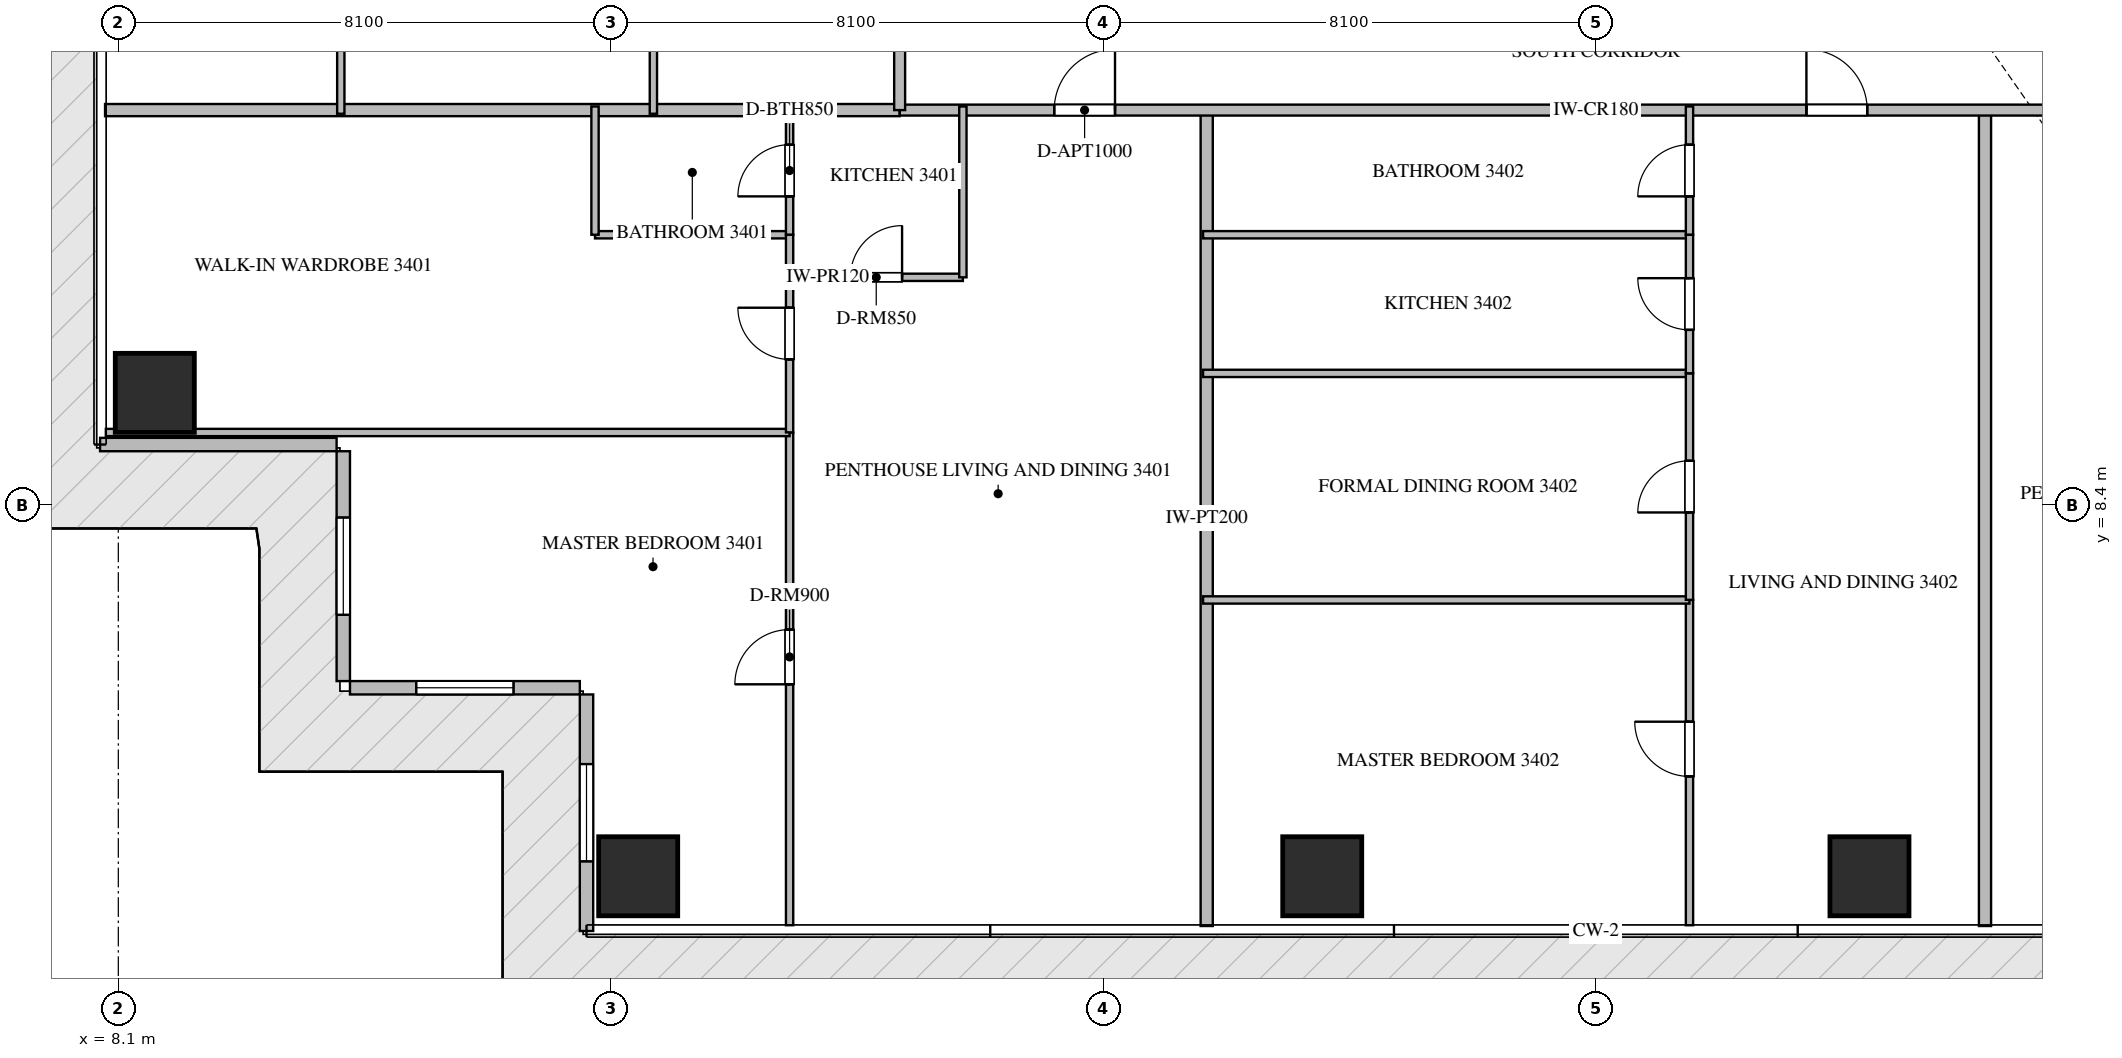
"""IFC4 building model, lengths in metres.
Left out: names, types, materials, properties, quantities, classifications, styles, units other than length and angle.
Written with IfcOpenShell. Run it as: python <this file> out.ifc"""

import sys

from ifc_helpers import new_model, si_unit, direction, frame, frame_2d, origin, origin_2d, place, context, subcontext, project, spatial, rectangle, extrude, source, transform, mapped, element, fill, save


model = new_model("IFC4")
c1 = context("Model", 3, precision=1e-05, world=origin(), true_north=direction((0.0, 1.0)))
c2 = subcontext(c1, "Body", "Model", "MODEL_VIEW")
j1 = project(units=[si_unit("LENGTHUNIT", "METRE"), si_unit("PLANEANGLEUNIT", "RADIAN")], contexts=[c1])
p1 = place(None, origin())
s1 = spatial("IfcSite", under=j1, at=p1, CompositionType="ELEMENT")
p2 = place(p1, origin())
s2 = spatial("IfcBuilding", under=s1, at=p2, CompositionType="ELEMENT")
p3 = place(p2, frame((0.0, 0.0, 138.9)))
s3 = spatial("IfcBuildingStorey", under=s2, at=p3, CompositionType="ELEMENT", Elevation=138.9)
m1 = source(origin(), c2, "Body", "SweptSolid", [
    extrude(rectangle(XDim=1.3, YDim=1.3, at=origin_2d()), origin(), (0.0, 0.0, 1.0), 3.75),
])
for number, where, z_axis, x_axis in (
    (1, (16.65, 2.3, -0.26), (0.0, 0.0, 1.0), (1.0, 0.0, 0.0)),
    (2, (27.9, 2.3, -0.26), (0.0, 0.0, 1.0), (1.0, 0.0, 0.0)),
    (3, (36.9, 2.3, -0.26), (0.0, 0.0, 1.0), (1.0, 0.0, 0.0)),
    (4, (8.7, 10.25, -0.26), (0.0, 0.0, 1.0), (1.0, 0.0, 0.0)),
):
    element("IfcColumn", number, at=place(p3, frame(where, z_axis=z_axis, x_axis=x_axis)), inside=s3, PredefinedType="COLUMN", context=c2, shape_type="MappedRepresentation", body=[
        mapped(m1, transform((0.0, 0.0, 0.0), scale=1.0)),
    ])
p4 = place(p3, frame((7.8, 9.4, 0.0), z_axis=(0.0, 0.0, 1.0), x_axis=(1.0, 0.0, 0.0)))
e5 = element("IfcWall", 5, at=p4, inside=s3, PredefinedType="ELEMENTEDWALL", context=c2, shape_type="SweptSolid", body=[
    extrude(rectangle(XDim=3.89, YDim=0.22, at=frame_2d((1.945, 0.0))), origin(), (0.0, 0.0, 1.0), 3.475),
])
p5 = place(p3, frame((11.8, 9.29, 0.0), z_axis=(0.0, 0.0, 1.0), x_axis=(0.0, -1.0, 0.0)))
e6 = element("IfcWall", 6, at=p5, inside=s3, PredefinedType="ELEMENTEDWALL", context=c2, shape_type="SweptSolid", body=[
    extrude(rectangle(XDim=3.78, YDim=0.22, at=frame_2d((1.89, 0.0))), origin(), (0.0, 0.0, 1.0), 3.475),
])
p6 = place(p5, frame((1.09, 0.0, 0.65)))
e7 = element("IfcOpeningElement", 7, at=p6, cuts=e6, PredefinedType="OPENING", context=c2, shape_type="SweptSolid", body=[
    extrude(rectangle(XDim=1.6, YDim=2.1, at=frame_2d((0.8, 1.05))), frame((0.0, 0.12, 0.0), z_axis=(0.0, -1.0, 0.0), x_axis=(1.0, 0.0, 0.0)), (0.0, 0.0, 1.0), 0.24),
])
p7 = place(p3, frame((11.91, 5.4, 0.0), z_axis=(0.0, 0.0, 1.0), x_axis=(1.0, 0.0, 0.0)))
e8 = element("IfcWall", 8, at=p7, inside=s3, PredefinedType="ELEMENTEDWALL", context=c2, shape_type="SweptSolid", body=[
    extrude(rectangle(XDim=3.78, YDim=0.22, at=frame_2d((1.89, 0.0))), origin(), (0.0, 0.0, 1.0), 3.475),
])
p8 = place(p7, frame((1.09, 0.0, 0.65)))
e9 = element("IfcOpeningElement", 9, at=p8, cuts=e8, PredefinedType="OPENING", context=c2, shape_type="SweptSolid", body=[
    extrude(rectangle(XDim=1.6, YDim=2.1, at=frame_2d((0.8, 1.05))), frame((0.0, 0.12, 0.0), z_axis=(0.0, -1.0, 0.0), x_axis=(1.0, 0.0, 0.0)), (0.0, 0.0, 1.0), 0.24),
])
p9 = place(p3, frame((15.8, 5.29, 0.0), z_axis=(0.0, 0.0, 1.0), x_axis=(0.0, -1.0, 0.0)))
e10 = element("IfcWall", 10, at=p9, inside=s3, PredefinedType="ELEMENTEDWALL", context=c2, shape_type="SweptSolid", body=[
    extrude(rectangle(XDim=3.89, YDim=0.22, at=frame_2d((1.945, 0.0))), origin(), (0.0, 0.0, 1.0), 3.475),
])
p10 = place(p9, frame((1.145, 0.0, 0.65)))
e11 = element("IfcOpeningElement", 11, at=p10, cuts=e10, PredefinedType="OPENING", context=c2, shape_type="SweptSolid", body=[
    extrude(rectangle(XDim=1.6, YDim=2.1, at=frame_2d((0.8, 1.05))), frame((0.0, 0.12, 0.0), z_axis=(0.0, -1.0, 0.0), x_axis=(1.0, 0.0, 0.0)), (0.0, 0.0, 1.0), 0.24),
])
for number, where, z_axis, x_axis in (
    (12, (26.0, 1.482, 0.0), (0.0, 0.0, 1.0), (0.0, 1.0, 0.0)),
    (13, (38.8, 1.482, 0.0), (0.0, 0.0, 1.0), (0.0, 1.0, 0.0)),
):
    element("IfcWall", number, at=place(p3, frame(where, z_axis=z_axis, x_axis=x_axis)), inside=s3, PredefinedType="PARTITIONING", context=c2, shape_type="SweptSolid", body=[
        extrude(rectangle(XDim=13.418, YDim=0.2, at=frame_2d((6.709, 0.0))), origin(), (0.0, 0.0, 1.0), 3.49),
    ])
p11 = place(p3, frame((7.882, 14.9, 0.0), z_axis=(0.0, 0.0, 1.0), x_axis=(1.0, 0.0, 0.0)))
e14 = element("IfcWall", 14, at=p11, inside=s3, PredefinedType="PARTITIONING", context=c2, shape_type="SweptSolid", body=[
    extrude(rectangle(XDim=13.068, YDim=0.2, at=frame_2d((6.534, 0.0))), origin(), (0.0, 0.0, 1.0), 3.49),
])
p12 = place(p3, frame((20.952, 14.9, 0.0), z_axis=(0.0, 0.0, 1.0), x_axis=(1.0, 0.0, 0.0)))
e15 = element("IfcWall", 15, at=p12, inside=s3, PredefinedType="PARTITIONING", context=c2, shape_type="SweptSolid", body=[
    extrude(rectangle(XDim=22.896, YDim=0.18, at=frame_2d((11.448, 0.0))), origin(), (0.0, 0.0, 1.0), 3.49),
])
p13 = place(p12, frame((2.54, 0.0, 0.0)))
e16 = element("IfcOpeningElement", 16, at=p13, cuts=e15, PredefinedType="OPENING", context=c2, shape_type="SweptSolid", body=[
    extrude(rectangle(XDim=1.0, YDim=2.15, at=frame_2d((0.5, 1.075))), frame((0.0, 0.1, 0.0), z_axis=(0.0, -1.0, 0.0), x_axis=(1.0, 0.0, 0.0)), (0.0, 0.0, 1.0), 0.2),
])
p14 = place(p12, frame((14.911, 0.0, 0.0)))
e17 = element("IfcOpeningElement", 17, at=p14, cuts=e15, PredefinedType="OPENING", context=c2, shape_type="SweptSolid", body=[
    extrude(rectangle(XDim=1.0, YDim=2.15, at=frame_2d((0.5, 1.075))), frame((0.0, 0.1, 0.0), z_axis=(0.0, -1.0, 0.0), x_axis=(1.0, 0.0, 0.0)), (0.0, 0.0, 1.0), 0.2),
])
p15 = place(p12, frame((19.356, 0.0, 0.0)))
e18 = element("IfcOpeningElement", 18, at=p15, cuts=e15, PredefinedType="OPENING", context=c2, shape_type="SweptSolid", body=[
    extrude(rectangle(XDim=1.0, YDim=2.15, at=frame_2d((0.5, 1.075))), frame((0.0, 0.1, 0.0), z_axis=(0.0, -1.0, 0.0), x_axis=(1.0, 0.0, 0.0)), (0.0, 0.0, 1.0), 0.2),
])
p16 = place(p3, frame((20.95, 14.9, 0.0), z_axis=(0.0, 0.0, 1.0), x_axis=(0.0, 1.0, 0.0)))
e19 = element("IfcWall", 19, at=p16, inside=s3, PredefinedType="PARTITIONING", context=c2, shape_type="SweptSolid", body=[
    extrude(rectangle(XDim=18.7, YDim=0.18, at=frame_2d((9.35, 0.0))), origin(), (0.0, 0.0, 1.0), 3.49),
])
p17 = place(p16, frame((14.603, 0.0, 0.0)))
e20 = element("IfcOpeningElement", 20, at=p17, cuts=e19, PredefinedType="OPENING", context=c2, shape_type="SweptSolid", body=[
    extrude(rectangle(XDim=1.0, YDim=2.15, at=frame_2d((0.5, 1.075))), frame((0.0, 0.1, 0.0), z_axis=(0.0, -1.0, 0.0), x_axis=(1.0, 0.0, 0.0)), (0.0, 0.0, 1.0), 0.2),
])
p18 = place(p3, frame((19.14, 12.15, 0.0), z_axis=(0.0, 0.0, 1.0), x_axis=(1.0, 0.0, 0.0)))
e21 = element("IfcWall", 21, at=p18, inside=s3, PredefinedType="PARTITIONING", context=c2, shape_type="SweptSolid", body=[
    extrude(rectangle(XDim=2.85, YDim=0.12, at=frame_2d((1.425, 0.0))), origin(), (0.0, 0.0, 1.0), 3.49),
])
p19 = place(p18, frame((1.0, 0.0, 0.0)))
e22 = element("IfcOpeningElement", 22, at=p19, cuts=e21, PredefinedType="OPENING", context=c2, shape_type="SweptSolid", body=[
    extrude(rectangle(XDim=0.85, YDim=2.1, at=frame_2d((0.425, 1.05))), frame((0.0, 0.07, 0.0), z_axis=(0.0, -1.0, 0.0), x_axis=(1.0, 0.0, 0.0)), (0.0, 0.0, 1.0), 0.14),
])
p20 = place(p3, frame((21.99, 12.15, 0.0), z_axis=(0.0, 0.0, 1.0), x_axis=(0.0, 1.0, 0.0)))
e23 = element("IfcWall", 23, at=p20, inside=s3, PredefinedType="PARTITIONING", context=c2, shape_type="SweptSolid", body=[
    extrude(rectangle(XDim=2.81, YDim=0.12, at=frame_2d((1.405, 0.0))), origin(), (0.0, 0.0, 1.0), 3.49),
])
p21 = place(p3, frame((19.14, 1.495, 0.0), z_axis=(0.0, 0.0, 1.0), x_axis=(0.0, 1.0, 0.0)))
e24 = element("IfcWall", 24, at=p21, inside=s3, PredefinedType="PARTITIONING", context=c2, shape_type="SweptSolid", body=[
    extrude(rectangle(XDim=8.103, YDim=0.12, at=frame_2d((4.051, 0.0))), origin(), (0.0, 0.0, 1.0), 3.49),
])
p22 = place(p21, frame((3.962, 0.0, 0.0)))
e25 = element("IfcOpeningElement", 25, at=p22, cuts=e24, PredefinedType="OPENING", context=c2, shape_type="SweptSolid", body=[
    extrude(rectangle(XDim=0.9, YDim=2.1, at=frame_2d((0.45, 1.05))), frame((0.0, 0.07, 0.0), z_axis=(0.0, -1.0, 0.0), x_axis=(1.0, 0.0, 0.0)), (0.0, 0.0, 1.0), 0.14),
])
p23 = place(p3, frame((7.895, 9.598, 0.0), z_axis=(0.0, 0.0, 1.0), x_axis=(1.0, 0.0, 0.0)))
e26 = element("IfcWall", 26, at=p23, inside=s3, PredefinedType="PARTITIONING", context=c2, shape_type="SweptSolid", body=[
    extrude(rectangle(XDim=11.245, YDim=0.12, at=frame_2d((5.623, 0.0))), origin(), (0.0, 0.0, 1.0), 3.49),
])
p24 = place(p3, frame((15.94, 12.85, 0.0), z_axis=(0.0, 0.0, 1.0), x_axis=(1.0, 0.0, 0.0)))
e27 = element("IfcWall", 27, at=p24, inside=s3, PredefinedType="PARTITIONING", context=c2, shape_type="SweptSolid", body=[
    extrude(rectangle(XDim=3.2, YDim=0.12, at=frame_2d((1.6, 0.0))), origin(), (0.0, 0.0, 1.0), 3.49),
])
p25 = place(p3, frame((15.94, 12.85, 0.0), z_axis=(0.0, 0.0, 1.0), x_axis=(0.0, 1.0, 0.0)))
e28 = element("IfcWall", 28, at=p25, inside=s3, PredefinedType="PARTITIONING", context=c2, shape_type="SweptSolid", body=[
    extrude(rectangle(XDim=2.11, YDim=0.12, at=frame_2d((1.055, 0.0))), origin(), (0.0, 0.0, 1.0), 3.49),
])
p26 = place(p3, frame((19.14, 9.6, 0.0), z_axis=(0.0, 0.0, 1.0), x_axis=(0.0, 1.0, 0.0)))
e29 = element("IfcWall", 29, at=p26, inside=s3, PredefinedType="PARTITIONING", context=c2, shape_type="SweptSolid", body=[
    extrude(rectangle(XDim=3.25, YDim=0.12, at=frame_2d((1.625, 0.0))), origin(), (0.0, 0.0, 1.0), 3.49),
])
p27 = place(p26, frame((1.2, 0.0, 0.0)))
e30 = element("IfcOpeningElement", 30, at=p27, cuts=e29, PredefinedType="OPENING", context=c2, shape_type="SweptSolid", body=[
    extrude(rectangle(XDim=0.85, YDim=2.1, at=frame_2d((0.425, 1.05))), frame((0.0, 0.07, 0.0), z_axis=(0.0, -1.0, 0.0), x_axis=(1.0, 0.0, 0.0)), (0.0, 0.0, 1.0), 0.14),
])
p28 = place(p3, frame((19.14, 12.852, 0.0), z_axis=(0.0, 0.0, 1.0), x_axis=(0.0, 1.0, 0.0)))
e31 = element("IfcWall", 31, at=p28, inside=s3, PredefinedType="PARTITIONING", context=c2, shape_type="SweptSolid", body=[
    extrude(rectangle(XDim=2.108, YDim=0.12, at=frame_2d((1.054, 0.0))), origin(), (0.0, 0.0, 1.0), 3.49),
])
p29 = place(p28, frame((0.629, 0.0, 0.0)))
e32 = element("IfcOpeningElement", 32, at=p29, cuts=e31, PredefinedType="OPENING", context=c2, shape_type="SweptSolid", body=[
    extrude(rectangle(XDim=0.85, YDim=2.1, at=frame_2d((0.425, 1.05))), frame((0.0, 0.07, 0.0), z_axis=(0.0, -1.0, 0.0), x_axis=(1.0, 0.0, 0.0)), (0.0, 0.0, 1.0), 0.14),
])
p30 = place(p3, frame((33.94, 1.495, 0.0), z_axis=(0.0, 0.0, 1.0), x_axis=(0.0, 1.0, 0.0)))
e33 = element("IfcWall", 33, at=p30, inside=s3, PredefinedType="PARTITIONING", context=c2, shape_type="SweptSolid", body=[
    extrude(rectangle(XDim=5.349, YDim=0.12, at=frame_2d((2.674, 0.0))), origin(), (0.0, 0.0, 1.0), 3.49),
])
p31 = place(p30, frame((2.447, 0.0, 0.0)))
e34 = element("IfcOpeningElement", 34, at=p31, cuts=e33, PredefinedType="OPENING", context=c2, shape_type="SweptSolid", body=[
    extrude(rectangle(XDim=0.9, YDim=2.1, at=frame_2d((0.45, 1.05))), frame((0.0, 0.07, 0.0), z_axis=(0.0, -1.0, 0.0), x_axis=(1.0, 0.0, 0.0)), (0.0, 0.0, 1.0), 0.14),
])
for number, where, z_axis, x_axis in (
    (35, (25.94, 6.844, 0.0), (0.0, 0.0, 1.0), (1.0, 0.0, 0.0)),
    (36, (25.94, 10.57, 0.0), (0.0, 0.0, 1.0), (1.0, 0.0, 0.0)),
    (37, (25.94, 12.85, 0.0), (0.0, 0.0, 1.0), (1.0, 0.0, 0.0)),
):
    element("IfcWall", number, at=place(p3, frame(where, z_axis=z_axis, x_axis=x_axis)), inside=s3, PredefinedType="PARTITIONING", context=c2, shape_type="SweptSolid", body=[
        extrude(rectangle(XDim=8.0, YDim=0.12, at=frame_2d((4.0, 0.0))), origin(), (0.0, 0.0, 1.0), 3.49),
    ])
p32 = place(p3, frame((33.94, 6.846, 0.0), z_axis=(0.0, 0.0, 1.0), x_axis=(0.0, 1.0, 0.0)))
e38 = element("IfcWall", 38, at=p32, inside=s3, PredefinedType="PARTITIONING", context=c2, shape_type="SweptSolid", body=[
    extrude(rectangle(XDim=3.724, YDim=0.12, at=frame_2d((1.862, 0.0))), origin(), (0.0, 0.0, 1.0), 3.49),
])
p33 = place(p32, frame((1.437, 0.0, 0.0)))
e39 = element("IfcOpeningElement", 39, at=p33, cuts=e38, PredefinedType="OPENING", context=c2, shape_type="SweptSolid", body=[
    extrude(rectangle(XDim=0.85, YDim=2.1, at=frame_2d((0.425, 1.05))), frame((0.0, 0.07, 0.0), z_axis=(0.0, -1.0, 0.0), x_axis=(1.0, 0.0, 0.0)), (0.0, 0.0, 1.0), 0.14),
])
p34 = place(p3, frame((33.94, 10.572, 0.0), z_axis=(0.0, 0.0, 1.0), x_axis=(0.0, 1.0, 0.0)))
e40 = element("IfcWall", 40, at=p34, inside=s3, PredefinedType="PARTITIONING", context=c2, shape_type="SweptSolid", body=[
    extrude(rectangle(XDim=2.278, YDim=0.12, at=frame_2d((1.139, 0.0))), origin(), (0.0, 0.0, 1.0), 3.49),
])
p35 = place(p34, frame((0.714, 0.0, 0.0)))
e41 = element("IfcOpeningElement", 41, at=p35, cuts=e40, PredefinedType="OPENING", context=c2, shape_type="SweptSolid", body=[
    extrude(rectangle(XDim=0.85, YDim=2.1, at=frame_2d((0.425, 1.05))), frame((0.0, 0.07, 0.0), z_axis=(0.0, -1.0, 0.0), x_axis=(1.0, 0.0, 0.0)), (0.0, 0.0, 1.0), 0.14),
])
p36 = place(p3, frame((33.94, 12.852, 0.0), z_axis=(0.0, 0.0, 1.0), x_axis=(0.0, 1.0, 0.0)))
e42 = element("IfcWall", 42, at=p36, inside=s3, PredefinedType="PARTITIONING", context=c2, shape_type="SweptSolid", body=[
    extrude(rectangle(XDim=2.108, YDim=0.12, at=frame_2d((1.054, 0.0))), origin(), (0.0, 0.0, 1.0), 3.49),
])
p37 = place(p36, frame((0.629, 0.0, 0.0)))
e43 = element("IfcOpeningElement", 43, at=p37, cuts=e42, PredefinedType="OPENING", context=c2, shape_type="SweptSolid", body=[
    extrude(rectangle(XDim=0.85, YDim=2.1, at=frame_2d((0.425, 1.05))), frame((0.0, 0.07, 0.0), z_axis=(0.0, -1.0, 0.0), x_axis=(1.0, 0.0, 0.0)), (0.0, 0.0, 1.0), 0.14),
])
p38 = place(p3, frame((11.759, 14.84, 0.0), z_axis=(0.0, 0.0, 1.0), x_axis=(0.0, 1.0, 0.0)))
e44 = element("IfcWall", 44, at=p38, inside=s3, PredefinedType="PARTITIONING", context=c2, shape_type="SweptSolid", body=[
    extrude(rectangle(XDim=11.65, YDim=0.12, at=frame_2d((5.825, 0.0))), origin(), (0.0, 0.0, 1.0), 3.49),
])
p39 = place(p3, frame((16.9, 14.84, 0.0), z_axis=(0.0, 0.0, 1.0), x_axis=(0.0, 1.0, 0.0)))
e45 = element("IfcWall", 45, at=p39, inside=s3, PredefinedType="PARTITIONING", context=c2, shape_type="SweptSolid", body=[
    extrude(rectangle(XDim=11.65, YDim=0.12, at=frame_2d((5.825, 0.0))), origin(), (0.0, 0.0, 1.0), 2.972),
])
m2 = source(origin(), c2, "Body", "SweptSolid", [
    extrude(rectangle(XDim=1.6, YDim=2.1, at=frame_2d((0.8, 1.05))), frame((0.0, 0.03, 0.0), z_axis=(0.0, -1.0, 0.0), x_axis=(1.0, 0.0, 0.0)), (0.0, 0.0, 1.0), 0.06),
])
p40 = place(p6, origin())
e46 = element("IfcWindow", 46, at=p40, inside=s3, PartitioningType="SINGLE_PANEL", PredefinedType="WINDOW", context=c2, shape_type="MappedRepresentation", body=[
    mapped(m2, transform((0.0, 0.0, 0.0), scale=1.0)),
])
fill(e7, e46)
p41 = place(p8, origin())
e47 = element("IfcWindow", 47, at=p41, inside=s3, PartitioningType="SINGLE_PANEL", PredefinedType="WINDOW", context=c2, shape_type="MappedRepresentation", body=[
    mapped(m2, transform((0.0, 0.0, 0.0), scale=1.0)),
])
fill(e9, e47)
p42 = place(p10, origin())
e48 = element("IfcWindow", 48, at=p42, inside=s3, PartitioningType="SINGLE_PANEL", PredefinedType="WINDOW", context=c2, shape_type="MappedRepresentation", body=[
    mapped(m2, transform((0.0, 0.0, 0.0), scale=1.0)),
])
fill(e11, e48)
m3 = source(origin(), c2, "Body", "SweptSolid", [
    extrude(rectangle(XDim=1.0, YDim=2.15, at=frame_2d((0.5, 1.075))), frame((0.0, 0.025, 0.0), z_axis=(0.0, -1.0, 0.0), x_axis=(1.0, 0.0, 0.0)), (0.0, 0.0, 1.0), 0.05),
])
p43 = place(p13, origin())
e49 = element("IfcDoor", 49, at=p43, inside=s3, OperationType="SINGLE_SWING_RIGHT", PredefinedType="DOOR", context=c2, shape_type="MappedRepresentation", body=[
    mapped(m3, transform((0.0, 0.0, 0.0), scale=1.0)),
])
fill(e16, e49)
p44 = place(p14, origin())
e50 = element("IfcDoor", 50, at=p44, inside=s3, OperationType="SINGLE_SWING_LEFT", PredefinedType="DOOR", context=c2, shape_type="MappedRepresentation", body=[
    mapped(m3, transform((0.0, 0.0, 0.0), scale=1.0)),
])
fill(e17, e50)
m4 = source(origin(), c2, "Body", "SweptSolid", [
    extrude(rectangle(XDim=0.85, YDim=2.1, at=frame_2d((0.425, 1.05))), frame((0.0, 0.025, 0.0), z_axis=(0.0, -1.0, 0.0), x_axis=(1.0, 0.0, 0.0)), (0.0, 0.0, 1.0), 0.05),
])
p45 = place(p19, origin())
e51 = element("IfcDoor", 51, at=p45, inside=s3, OperationType="SINGLE_SWING_RIGHT", PredefinedType="DOOR", context=c2, shape_type="MappedRepresentation", body=[
    mapped(m4, transform((0.0, 0.0, 0.0), scale=1.0)),
])
fill(e22, e51)
m5 = source(origin(), c2, "Body", "SweptSolid", [
    extrude(rectangle(XDim=0.9, YDim=2.1, at=frame_2d((0.45, 1.05))), frame((0.0, 0.025, 0.0), z_axis=(0.0, -1.0, 0.0), x_axis=(1.0, 0.0, 0.0)), (0.0, 0.0, 1.0), 0.05),
])
p46 = place(p22, origin())
e52 = element("IfcDoor", 52, at=p46, inside=s3, OperationType="SINGLE_SWING_LEFT", PredefinedType="DOOR", context=c2, shape_type="MappedRepresentation", body=[
    mapped(m5, transform((0.0, 0.0, 0.0), scale=1.0)),
])
fill(e25, e52)
p47 = place(p27, origin())
e53 = element("IfcDoor", 53, at=p47, inside=s3, OperationType="SINGLE_SWING_RIGHT", PredefinedType="DOOR", context=c2, shape_type="MappedRepresentation", body=[
    mapped(m4, transform((0.0, 0.0, 0.0), scale=1.0)),
])
fill(e30, e53)
p48 = place(p29, origin())
e54 = element("IfcDoor", 54, at=p48, inside=s3, OperationType="SINGLE_SWING_LEFT", PredefinedType="DOOR", context=c2, shape_type="MappedRepresentation", body=[
    mapped(m4, transform((0.0, 0.0, 0.0), scale=1.0)),
])
fill(e32, e54)
p49 = place(p31, origin())
e55 = element("IfcDoor", 55, at=p49, inside=s3, OperationType="SINGLE_SWING_RIGHT", PredefinedType="DOOR", context=c2, shape_type="MappedRepresentation", body=[
    mapped(m5, transform((0.0, 0.0, 0.0), scale=1.0)),
])
fill(e34, e55)
p50 = place(p33, origin())
e56 = element("IfcDoor", 56, at=p50, inside=s3, OperationType="SINGLE_SWING_LEFT", PredefinedType="DOOR", context=c2, shape_type="MappedRepresentation", body=[
    mapped(m4, transform((0.0, 0.0, 0.0), scale=1.0)),
])
fill(e39, e56)
p51 = place(p35, origin())
e57 = element("IfcDoor", 57, at=p51, inside=s3, OperationType="SINGLE_SWING_RIGHT", PredefinedType="DOOR", context=c2, shape_type="MappedRepresentation", body=[
    mapped(m4, transform((0.0, 0.0, 0.0), scale=1.0)),
])
fill(e41, e57)
p52 = place(p37, origin())
e58 = element("IfcDoor", 58, at=p52, inside=s3, OperationType="SINGLE_SWING_LEFT", PredefinedType="DOOR", context=c2, shape_type="MappedRepresentation", body=[
    mapped(m4, transform((0.0, 0.0, 0.0), scale=1.0)),
])
fill(e43, e58)
save(model, sys.argv[1])
